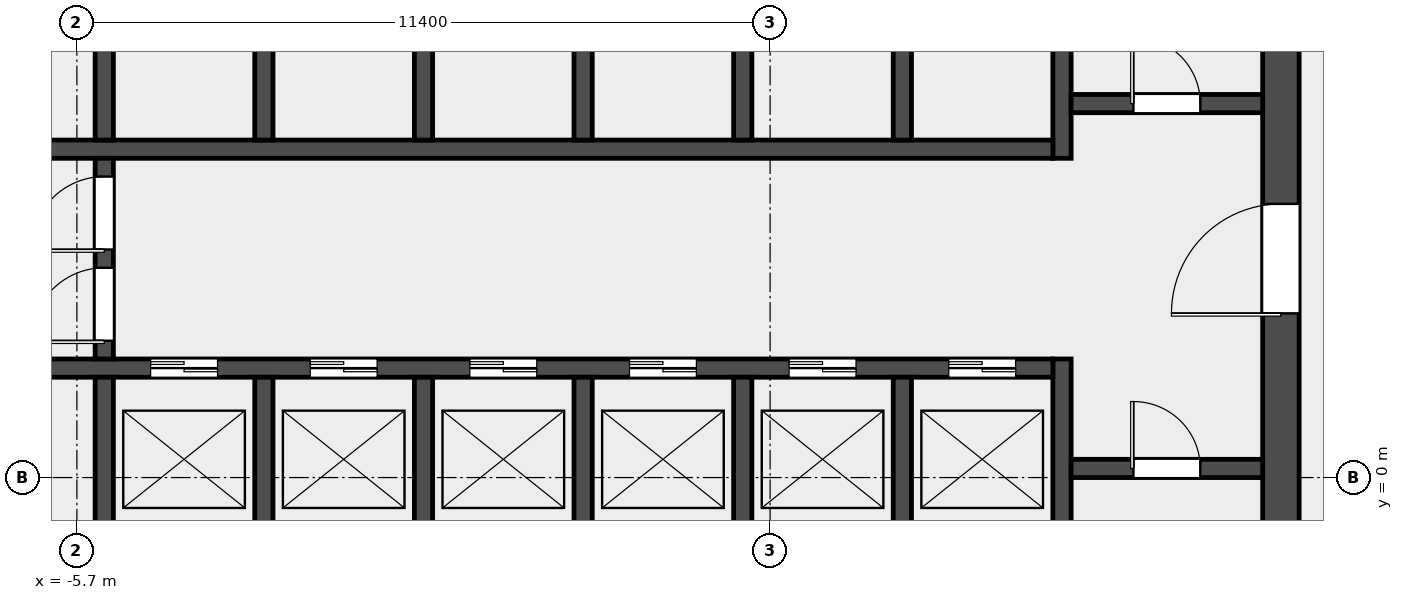
"""IFC4 building model, lengths in metres.
Left out: names, types, materials, properties, quantities, classifications, styles, units other than length and angle.
Written with IfcOpenShell. Run it as: python <this file> out.ifc"""

import sys

from ifc_helpers import new_model, si_unit, direction, frame, frame_2d, origin, place, context, subcontext, project, spatial, rectangle, extrude, element, fill, save


model = new_model("IFC4")
c1 = context("Model", 3, precision=1e-05, world=origin(), true_north=direction((0.0, 1.0)))
c2 = subcontext(c1, "Body", "Model", "MODEL_VIEW")
j1 = project(units=[si_unit("LENGTHUNIT", "METRE"), si_unit("PLANEANGLEUNIT", "RADIAN")], contexts=[c1])
p1 = place(None, origin())
s1 = spatial("IfcSite", under=j1, at=p1, CompositionType="ELEMENT")
p2 = place(p1, origin())
s2 = spatial("IfcBuilding", under=s1, at=p2, CompositionType="ELEMENT")
p3 = place(p2, frame((0.0, 0.0, 20.0)))
s3 = spatial("IfcBuildingStorey", under=s2, at=p3, CompositionType="ELEMENT", Elevation=20.0)
p4 = place(p3, frame((14.1, -6.6, 0.0), z_axis=(0.0, 0.0, 1.0), x_axis=(0.0, 1.0, 0.0)))
e1 = element("IfcWall", 1, at=p4, inside=s3, PredefinedType="SHEAR", context=c2, shape_type="SweptSolid", body=[
    extrude(rectangle(XDim=19.5, YDim=0.6, at=frame_2d((9.75, 0.0))), origin(), (0.0, 0.0, 1.0), 5.2),
])
p5 = place(p4, frame((9.3, 0.0, 0.0)))
e2 = element("IfcOpeningElement", 2, at=p5, cuts=e1, PredefinedType="OPENING", context=c2, shape_type="SweptSolid", body=[
    extrude(rectangle(XDim=1.8, YDim=2.1, at=frame_2d((0.9, 1.05))), frame((0.0, 0.312, 0.0), z_axis=(0.0, -1.0, 0.0), x_axis=(1.0, 0.0, 0.0)), (0.0, 0.0, 1.0), 0.624),
])
p6 = place(p3, frame((10.5, -6.6, 0.0), z_axis=(0.0, 0.0, 1.0), x_axis=(0.0, 1.0, 0.0)))
e3 = element("IfcWall", 3, at=p6, inside=s3, PredefinedType="SHEAR", context=c2, shape_type="SweptSolid", body=[
    extrude(rectangle(XDim=8.55, YDim=0.3, at=frame_2d((4.275, 0.0))), origin(), (0.0, 0.0, 1.0), 5.2),
])
p7 = place(p3, frame((10.5, 5.25, 0.0), z_axis=(0.0, 0.0, 1.0), x_axis=(0.0, 1.0, 0.0)))
e4 = element("IfcWall", 4, at=p7, inside=s3, PredefinedType="SHEAR", context=c2, shape_type="SweptSolid", body=[
    extrude(rectangle(XDim=7.65, YDim=0.3, at=frame_2d((3.825, 0.0))), origin(), (0.0, 0.0, 1.0), 5.2),
])
p8 = place(p3, frame((10.65, 0.15, 0.0), z_axis=(0.0, 0.0, 1.0), x_axis=(1.0, 0.0, 0.0)))
e5 = element("IfcWall", 5, at=p8, inside=s3, PredefinedType="SOLIDWALL", context=c2, shape_type="SweptSolid", body=[
    extrude(rectangle(XDim=3.15, YDim=0.3, at=frame_2d((1.575, 0.0))), origin(), (0.0, 0.0, 1.0), 5.2),
])
p9 = place(p8, frame((1.025, 0.0, 0.0)))
e6 = element("IfcOpeningElement", 6, at=p9, cuts=e5, PredefinedType="OPENING", context=c2, shape_type="SweptSolid", body=[
    extrude(rectangle(XDim=1.1, YDim=2.1, at=frame_2d((0.55, 1.05))), frame((0.0, 0.162, 0.0), z_axis=(0.0, -1.0, 0.0), x_axis=(1.0, 0.0, 0.0)), (0.0, 0.0, 1.0), 0.324),
])
p10 = place(p3, frame((10.65, 6.15, 0.0), z_axis=(0.0, 0.0, 1.0), x_axis=(1.0, 0.0, 0.0)))
e7 = element("IfcWall", 7, at=p10, inside=s3, PredefinedType="SOLIDWALL", context=c2, shape_type="SweptSolid", body=[
    extrude(rectangle(XDim=3.15, YDim=0.3, at=frame_2d((1.575, 0.0))), origin(), (0.0, 0.0, 1.0), 5.2),
])
p11 = place(p10, frame((1.025, 0.0, 0.0)))
e8 = element("IfcOpeningElement", 8, at=p11, cuts=e7, PredefinedType="OPENING", context=c2, shape_type="SweptSolid", body=[
    extrude(rectangle(XDim=1.1, YDim=2.1, at=frame_2d((0.55, 1.05))), frame((0.0, 0.162, 0.0), z_axis=(0.0, -1.0, 0.0), x_axis=(1.0, 0.0, 0.0)), (0.0, 0.0, 1.0), 0.324),
])
p12 = place(p3, frame((-10.35, 1.8, 0.0), z_axis=(0.0, 0.0, 1.0), x_axis=(1.0, 0.0, 0.0)))
e9 = element("IfcWall", 9, at=p12, inside=s3, PredefinedType="SOLIDWALL", context=c2, shape_type="SweptSolid", body=[
    extrude(rectangle(XDim=20.7, YDim=0.3, at=frame_2d((10.35, 0.0))), origin(), (0.0, 0.0, 1.0), 5.2),
])
p13 = place(p12, frame((0.512, 0.0, 0.0)))
e10 = element("IfcOpeningElement", 10, at=p13, cuts=e9, PredefinedType="OPENING", context=c2, shape_type="SweptSolid", body=[
    extrude(rectangle(XDim=1.3, YDim=2.1, at=frame_2d((0.65, 1.05))), frame((0.0, 0.162, 0.0), z_axis=(0.0, -1.0, 0.0), x_axis=(1.0, 0.0, 0.0)), (0.0, 0.0, 1.0), 0.324),
])
p14 = place(p12, frame((5.863, 0.0, 0.0)))
e11 = element("IfcOpeningElement", 11, at=p14, cuts=e9, PredefinedType="OPENING", context=c2, shape_type="SweptSolid", body=[
    extrude(rectangle(XDim=1.1, YDim=2.1, at=frame_2d((0.55, 1.05))), frame((0.0, 0.162, 0.0), z_axis=(0.0, -1.0, 0.0), x_axis=(1.0, 0.0, 0.0)), (0.0, 0.0, 1.0), 0.324),
])
p15 = place(p12, frame((8.488, 0.0, 0.0)))
e12 = element("IfcOpeningElement", 12, at=p15, cuts=e9, PredefinedType="OPENING", context=c2, shape_type="SweptSolid", body=[
    extrude(rectangle(XDim=1.1, YDim=2.1, at=frame_2d((0.55, 1.05))), frame((0.0, 0.162, 0.0), z_axis=(0.0, -1.0, 0.0), x_axis=(1.0, 0.0, 0.0)), (0.0, 0.0, 1.0), 0.324),
])
p16 = place(p12, frame((11.113, 0.0, 0.0)))
e13 = element("IfcOpeningElement", 13, at=p16, cuts=e9, PredefinedType="OPENING", context=c2, shape_type="SweptSolid", body=[
    extrude(rectangle(XDim=1.1, YDim=2.1, at=frame_2d((0.55, 1.05))), frame((0.0, 0.162, 0.0), z_axis=(0.0, -1.0, 0.0), x_axis=(1.0, 0.0, 0.0)), (0.0, 0.0, 1.0), 0.324),
])
p17 = place(p12, frame((13.738, 0.0, 0.0)))
e14 = element("IfcOpeningElement", 14, at=p17, cuts=e9, PredefinedType="OPENING", context=c2, shape_type="SweptSolid", body=[
    extrude(rectangle(XDim=1.1, YDim=2.1, at=frame_2d((0.55, 1.05))), frame((0.0, 0.162, 0.0), z_axis=(0.0, -1.0, 0.0), x_axis=(1.0, 0.0, 0.0)), (0.0, 0.0, 1.0), 0.324),
])
p18 = place(p12, frame((16.363, 0.0, 0.0)))
e15 = element("IfcOpeningElement", 15, at=p18, cuts=e9, PredefinedType="OPENING", context=c2, shape_type="SweptSolid", body=[
    extrude(rectangle(XDim=1.1, YDim=2.1, at=frame_2d((0.55, 1.05))), frame((0.0, 0.162, 0.0), z_axis=(0.0, -1.0, 0.0), x_axis=(1.0, 0.0, 0.0)), (0.0, 0.0, 1.0), 0.324),
])
p19 = place(p12, frame((18.988, 0.0, 0.0)))
e16 = element("IfcOpeningElement", 16, at=p19, cuts=e9, PredefinedType="OPENING", context=c2, shape_type="SweptSolid", body=[
    extrude(rectangle(XDim=1.1, YDim=2.1, at=frame_2d((0.55, 1.05))), frame((0.0, 0.162, 0.0), z_axis=(0.0, -1.0, 0.0), x_axis=(1.0, 0.0, 0.0)), (0.0, 0.0, 1.0), 0.324),
])
p20 = place(p3, frame((-10.35, 5.4, 0.0), z_axis=(0.0, 0.0, 1.0), x_axis=(1.0, 0.0, 0.0)))
e17 = element("IfcWall", 17, at=p20, inside=s3, PredefinedType="SOLIDWALL", context=c2, shape_type="SweptSolid", body=[
    extrude(rectangle(XDim=20.7, YDim=0.3, at=frame_2d((10.35, 0.0))), origin(), (0.0, 0.0, 1.0), 5.2),
])
p21 = place(p20, frame((0.512, 0.0, 0.0)))
e18 = element("IfcOpeningElement", 18, at=p21, cuts=e17, PredefinedType="OPENING", context=c2, shape_type="SweptSolid", body=[
    extrude(rectangle(XDim=1.3, YDim=2.1, at=frame_2d((0.65, 1.05))), frame((0.0, 0.162, 0.0), z_axis=(0.0, -1.0, 0.0), x_axis=(1.0, 0.0, 0.0)), (0.0, 0.0, 1.0), 0.324),
])
for number, where, z_axis, x_axis in (
    (19, (-5.25, -1.05, 0.0), (0.0, 0.0, 1.0), (0.0, 1.0, 0.0)),
    (20, (-2.625, -1.05, 0.0), (0.0, 0.0, 1.0), (0.0, 1.0, 0.0)),
    (21, (0.0, -1.05, 0.0), (0.0, 0.0, 1.0), (0.0, 1.0, 0.0)),
    (22, (2.625, -1.05, 0.0), (0.0, 0.0, 1.0), (0.0, 1.0, 0.0)),
    (23, (5.25, -1.05, 0.0), (0.0, 0.0, 1.0), (0.0, 1.0, 0.0)),
    (24, (7.875, -1.05, 0.0), (0.0, 0.0, 1.0), (0.0, 1.0, 0.0)),
    (25, (-5.25, 5.55, 0.0), (0.0, 0.0, 1.0), (0.0, 1.0, 0.0)),
    (26, (-2.625, 5.55, 0.0), (0.0, 0.0, 1.0), (0.0, 1.0, 0.0)),
    (27, (0.0, 5.55, 0.0), (0.0, 0.0, 1.0), (0.0, 1.0, 0.0)),
    (28, (2.625, 5.55, 0.0), (0.0, 0.0, 1.0), (0.0, 1.0, 0.0)),
    (29, (5.25, 5.55, 0.0), (0.0, 0.0, 1.0), (0.0, 1.0, 0.0)),
    (30, (7.875, 5.55, 0.0), (0.0, 0.0, 1.0), (0.0, 1.0, 0.0)),
):
    element("IfcWall", number, at=place(p3, frame(where, z_axis=z_axis, x_axis=x_axis)), inside=s3, PredefinedType="SOLIDWALL", context=c2, shape_type="SweptSolid", body=[
        extrude(rectangle(XDim=2.7, YDim=0.3, at=frame_2d((1.35, 0.0))), origin(), (0.0, 0.0, 1.0), 5.2),
    ])
p22 = place(p3, frame((-5.25, 1.95, 0.0), z_axis=(0.0, 0.0, 1.0), x_axis=(0.0, 1.0, 0.0)))
e31 = element("IfcWall", 31, at=p22, inside=s3, PredefinedType="SOLIDWALL", context=c2, shape_type="SweptSolid", body=[
    extrude(rectangle(XDim=3.3, YDim=0.3, at=frame_2d((1.65, 0.0))), origin(), (0.0, 0.0, 1.0), 5.2),
])
p23 = place(p22, frame((0.3, 0.0, 0.0)))
e32 = element("IfcOpeningElement", 32, at=p23, cuts=e31, PredefinedType="OPENING", context=c2, shape_type="SweptSolid", body=[
    extrude(rectangle(XDim=1.2, YDim=2.1, at=frame_2d((0.6, 1.05))), frame((0.0, 0.162, 0.0), z_axis=(0.0, -1.0, 0.0), x_axis=(1.0, 0.0, 0.0)), (0.0, 0.0, 1.0), 0.324),
])
p24 = place(p22, frame((1.8, 0.0, 0.0)))
e33 = element("IfcOpeningElement", 33, at=p24, cuts=e31, PredefinedType="OPENING", context=c2, shape_type="SweptSolid", body=[
    extrude(rectangle(XDim=1.2, YDim=2.1, at=frame_2d((0.6, 1.05))), frame((0.0, 0.162, 0.0), z_axis=(0.0, -1.0, 0.0), x_axis=(1.0, 0.0, 0.0)), (0.0, 0.0, 1.0), 0.324),
])
p25 = place(p9, origin())
e34 = element("IfcDoor", 34, at=p25, inside=s3, OperationType="SINGLE_SWING_RIGHT", PredefinedType="DOOR", context=c2, shape_type="SweptSolid", body=[
    extrude(rectangle(XDim=1.1, YDim=2.1, at=frame_2d((0.55, 1.05))), frame((0.0, 0.025, 0.0), z_axis=(0.0, -1.0, 0.0), x_axis=(1.0, 0.0, 0.0)), (0.0, 0.0, 1.0), 0.05),
])
fill(e6, e34)
p26 = place(p11, origin())
e35 = element("IfcDoor", 35, at=p26, inside=s3, OperationType="SINGLE_SWING_RIGHT", PredefinedType="DOOR", context=c2, shape_type="SweptSolid", body=[
    extrude(rectangle(XDim=1.1, YDim=2.1, at=frame_2d((0.55, 1.05))), frame((0.0, 0.025, 0.0), z_axis=(0.0, -1.0, 0.0), x_axis=(1.0, 0.0, 0.0)), (0.0, 0.0, 1.0), 0.05),
])
fill(e8, e35)
p27 = place(p5, origin())
e36 = element("IfcDoor", 36, at=p27, inside=s3, OperationType="DOUBLE_DOOR_SINGLE_SWING", PredefinedType="DOOR", context=c2, shape_type="SweptSolid", body=[
    extrude(rectangle(XDim=1.8, YDim=2.1, at=frame_2d((0.9, 1.05))), frame((0.0, 0.025, 0.0), z_axis=(0.0, -1.0, 0.0), x_axis=(1.0, 0.0, 0.0)), (0.0, 0.0, 1.0), 0.05),
])
fill(e2, e36)
p28 = place(p23, origin())
e37 = element("IfcDoor", 37, at=p28, inside=s3, OperationType="SINGLE_SWING_LEFT", PredefinedType="DOOR", context=c2, shape_type="SweptSolid", body=[
    extrude(rectangle(XDim=1.2, YDim=2.1, at=frame_2d((0.6, 1.05))), frame((0.0, 0.025, 0.0), z_axis=(0.0, -1.0, 0.0), x_axis=(1.0, 0.0, 0.0)), (0.0, 0.0, 1.0), 0.05),
])
fill(e32, e37)
p29 = place(p24, origin())
e38 = element("IfcDoor", 38, at=p29, inside=s3, OperationType="SINGLE_SWING_RIGHT", PredefinedType="DOOR", context=c2, shape_type="SweptSolid", body=[
    extrude(rectangle(XDim=1.2, YDim=2.1, at=frame_2d((0.6, 1.05))), frame((0.0, 0.025, 0.0), z_axis=(0.0, -1.0, 0.0), x_axis=(1.0, 0.0, 0.0)), (0.0, 0.0, 1.0), 0.05),
])
fill(e33, e38)
p30 = place(p14, origin())
e39 = element("IfcDoor", 39, at=p30, inside=s3, OperationType="DOUBLE_DOOR_SLIDING", PredefinedType="DOOR", context=c2, shape_type="SweptSolid", body=[
    extrude(rectangle(XDim=1.1, YDim=2.1, at=frame_2d((0.55, 1.05))), frame((0.0, 0.025, 0.0), z_axis=(0.0, -1.0, 0.0), x_axis=(1.0, 0.0, 0.0)), (0.0, 0.0, 1.0), 0.05),
])
fill(e11, e39)
p31 = place(p15, origin())
e40 = element("IfcDoor", 40, at=p31, inside=s3, OperationType="DOUBLE_DOOR_SLIDING", PredefinedType="DOOR", context=c2, shape_type="SweptSolid", body=[
    extrude(rectangle(XDim=1.1, YDim=2.1, at=frame_2d((0.55, 1.05))), frame((0.0, 0.025, 0.0), z_axis=(0.0, -1.0, 0.0), x_axis=(1.0, 0.0, 0.0)), (0.0, 0.0, 1.0), 0.05),
])
fill(e12, e40)
p32 = place(p16, origin())
e41 = element("IfcDoor", 41, at=p32, inside=s3, OperationType="DOUBLE_DOOR_SLIDING", PredefinedType="DOOR", context=c2, shape_type="SweptSolid", body=[
    extrude(rectangle(XDim=1.1, YDim=2.1, at=frame_2d((0.55, 1.05))), frame((0.0, 0.025, 0.0), z_axis=(0.0, -1.0, 0.0), x_axis=(1.0, 0.0, 0.0)), (0.0, 0.0, 1.0), 0.05),
])
fill(e13, e41)
p33 = place(p17, origin())
e42 = element("IfcDoor", 42, at=p33, inside=s3, OperationType="DOUBLE_DOOR_SLIDING", PredefinedType="DOOR", context=c2, shape_type="SweptSolid", body=[
    extrude(rectangle(XDim=1.1, YDim=2.1, at=frame_2d((0.55, 1.05))), frame((0.0, 0.025, 0.0), z_axis=(0.0, -1.0, 0.0), x_axis=(1.0, 0.0, 0.0)), (0.0, 0.0, 1.0), 0.05),
])
fill(e14, e42)
p34 = place(p18, origin())
e43 = element("IfcDoor", 43, at=p34, inside=s3, OperationType="DOUBLE_DOOR_SLIDING", PredefinedType="DOOR", context=c2, shape_type="SweptSolid", body=[
    extrude(rectangle(XDim=1.1, YDim=2.1, at=frame_2d((0.55, 1.05))), frame((0.0, 0.025, 0.0), z_axis=(0.0, -1.0, 0.0), x_axis=(1.0, 0.0, 0.0)), (0.0, 0.0, 1.0), 0.05),
])
fill(e15, e43)
p35 = place(p19, origin())
e44 = element("IfcDoor", 44, at=p35, inside=s3, OperationType="DOUBLE_DOOR_SLIDING", PredefinedType="DOOR", context=c2, shape_type="SweptSolid", body=[
    extrude(rectangle(XDim=1.1, YDim=2.1, at=frame_2d((0.55, 1.05))), frame((0.0, 0.025, 0.0), z_axis=(0.0, -1.0, 0.0), x_axis=(1.0, 0.0, 0.0)), (0.0, 0.0, 1.0), 0.05),
])
fill(e16, e44)
save(model, sys.argv[1])
